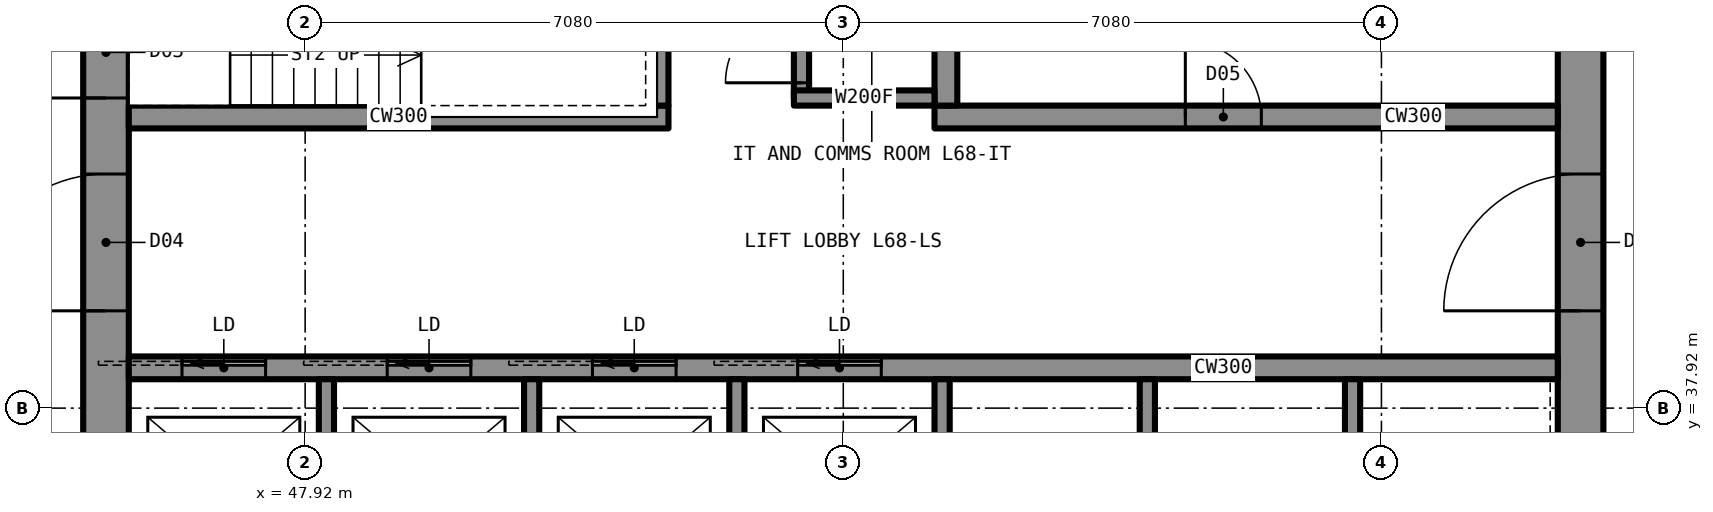
"""IFC4 building model, lengths in metres.
Left out: names, types, materials, properties, quantities, classifications, styles, units other than length and angle.
Written with IfcOpenShell. Run it as: python <this file> out.ifc"""

import sys

from ifc_helpers import new_model, si_unit, direction, frame, frame_2d, origin, place, context, subcontext, project, spatial, rectangle, extrude, element, fill, save


model = new_model("IFC4")
c1 = context("Model", 3, precision=1e-05, world=origin(), true_north=direction((0.0, 1.0)))
c2 = subcontext(c1, "Body", "Model", "MODEL_VIEW")
j1 = project(units=[si_unit("LENGTHUNIT", "METRE"), si_unit("PLANEANGLEUNIT", "RADIAN")], contexts=[c1])
p1 = place(None, origin())
s1 = spatial("IfcSite", under=j1, at=p1, CompositionType="ELEMENT")
p2 = place(p1, origin())
s2 = spatial("IfcBuilding", under=s1, at=p2, CompositionType="ELEMENT")
p3 = place(p2, frame((0.0, 0.0, 247.7)))
s3 = spatial("IfcBuildingStorey", under=s2, at=p3, CompositionType="ELEMENT", Elevation=247.7)
p4 = place(p3, frame((64.7, 35.6, 0.0), z_axis=(0.0, 0.0, 1.0), x_axis=(0.0, 1.0, 0.0)))
e1 = element("IfcWall", 1, at=p4, inside=s3, PredefinedType="SHEAR", context=c2, shape_type="SweptSolid", body=[
    extrude(rectangle(XDim=18.8, YDim=0.6, at=frame_2d((9.4, 0.0))), origin(), (0.0, 0.0, 1.0), 3.5),
])
p5 = place(p4, frame((13.4, 0.0, 0.0)))
e2 = element("IfcOpeningElement", 2, at=p5, cuts=e1, PredefinedType="OPENING", context=c2, shape_type="SweptSolid", body=[
    extrude(rectangle(XDim=1.8, YDim=2.2, at=frame_2d((0.9, 1.1))), frame((0.0, 0.31, 0.0), z_axis=(0.0, -1.0, 0.0), x_axis=(1.0, 0.0, 0.0)), (0.0, 0.0, 1.0), 0.62),
])
p6 = place(p4, frame((3.6, 0.0, 0.0)))
e3 = element("IfcOpeningElement", 3, at=p6, cuts=e1, PredefinedType="OPENING", context=c2, shape_type="SweptSolid", body=[
    extrude(rectangle(XDim=1.8, YDim=2.2, at=frame_2d((0.9, 1.1))), frame((0.0, 0.31, 0.0), z_axis=(0.0, -1.0, 0.0), x_axis=(1.0, 0.0, 0.0)), (0.0, 0.0, 1.0), 0.62),
])
p7 = place(p3, frame((45.3, 35.6, 0.0), z_axis=(0.0, 0.0, 1.0), x_axis=(0.0, 1.0, 0.0)))
e4 = element("IfcWall", 4, at=p7, inside=s3, PredefinedType="SHEAR", context=c2, shape_type="SweptSolid", body=[
    extrude(rectangle(XDim=18.8, YDim=0.6, at=frame_2d((9.4, 0.0))), origin(), (0.0, 0.0, 1.0), 3.5),
])
p8 = place(p7, frame((13.4, 0.0, 0.0)))
e5 = element("IfcOpeningElement", 5, at=p8, cuts=e4, PredefinedType="OPENING", context=c2, shape_type="SweptSolid", body=[
    extrude(rectangle(XDim=1.8, YDim=2.2, at=frame_2d((0.9, 1.1))), frame((0.0, 0.31, 0.0), z_axis=(0.0, -1.0, 0.0), x_axis=(1.0, 0.0, 0.0)), (0.0, 0.0, 1.0), 0.62),
])
p9 = place(p7, frame((3.6, 0.0, 0.0)))
e6 = element("IfcOpeningElement", 6, at=p9, cuts=e4, PredefinedType="OPENING", context=c2, shape_type="SweptSolid", body=[
    extrude(rectangle(XDim=1.8, YDim=2.2, at=frame_2d((0.9, 1.1))), frame((0.0, 0.31, 0.0), z_axis=(0.0, -1.0, 0.0), x_axis=(1.0, 0.0, 0.0)), (0.0, 0.0, 1.0), 0.62),
])
p10 = place(p7, frame((6.4, 0.0, 0.0)))
e7 = element("IfcOpeningElement", 7, at=p10, cuts=e4, PredefinedType="OPENING", context=c2, shape_type="SweptSolid", body=[
    extrude(rectangle(XDim=1.2, YDim=2.2, at=frame_2d((0.6, 1.1))), frame((0.0, 0.31, 0.0), z_axis=(0.0, -1.0, 0.0), x_axis=(1.0, 0.0, 0.0)), (0.0, 0.0, 1.0), 0.62),
])
p11 = place(p3, frame((45.6, 38.45, 0.0), z_axis=(0.0, 0.0, 1.0), x_axis=(1.0, 0.0, 0.0)))
e8 = element("IfcWall", 8, at=p11, inside=s3, PredefinedType="SHEAR", context=c2, shape_type="SweptSolid", body=[
    extrude(rectangle(XDim=18.8, YDim=0.3, at=frame_2d((9.4, 0.0))), origin(), (0.0, 0.0, 1.0), 3.5),
])
p12 = place(p11, frame((0.7, 0.0, 0.0)))
e9 = element("IfcOpeningElement", 9, at=p12, cuts=e8, PredefinedType="OPENING", context=c2, shape_type="SweptSolid", body=[
    extrude(rectangle(XDim=1.1, YDim=2.2, at=frame_2d((0.55, 1.1))), frame((0.0, 0.16, 0.0), z_axis=(0.0, -1.0, 0.0), x_axis=(1.0, 0.0, 0.0)), (0.0, 0.0, 1.0), 0.32),
])
p13 = place(p11, frame((3.4, 0.0, 0.0)))
e10 = element("IfcOpeningElement", 10, at=p13, cuts=e8, PredefinedType="OPENING", context=c2, shape_type="SweptSolid", body=[
    extrude(rectangle(XDim=1.1, YDim=2.2, at=frame_2d((0.55, 1.1))), frame((0.0, 0.16, 0.0), z_axis=(0.0, -1.0, 0.0), x_axis=(1.0, 0.0, 0.0)), (0.0, 0.0, 1.0), 0.32),
])
p14 = place(p11, frame((6.1, 0.0, 0.0)))
e11 = element("IfcOpeningElement", 11, at=p14, cuts=e8, PredefinedType="OPENING", context=c2, shape_type="SweptSolid", body=[
    extrude(rectangle(XDim=1.1, YDim=2.2, at=frame_2d((0.55, 1.1))), frame((0.0, 0.16, 0.0), z_axis=(0.0, -1.0, 0.0), x_axis=(1.0, 0.0, 0.0)), (0.0, 0.0, 1.0), 0.32),
])
p15 = place(p11, frame((8.8, 0.0, 0.0)))
e12 = element("IfcOpeningElement", 12, at=p15, cuts=e8, PredefinedType="OPENING", context=c2, shape_type="SweptSolid", body=[
    extrude(rectangle(XDim=1.1, YDim=2.2, at=frame_2d((0.55, 1.1))), frame((0.0, 0.16, 0.0), z_axis=(0.0, -1.0, 0.0), x_axis=(1.0, 0.0, 0.0)), (0.0, 0.0, 1.0), 0.32),
])
p16 = place(p3, frame((45.6, 41.75, 0.0), z_axis=(0.0, 0.0, 1.0), x_axis=(1.0, 0.0, 0.0)))
e13 = element("IfcWall", 13, at=p16, inside=s3, PredefinedType="SHEAR", context=c2, shape_type="SweptSolid", body=[
    extrude(rectangle(XDim=7.1, YDim=0.3, at=frame_2d((3.55, 0.0))), origin(), (0.0, 0.0, 1.0), 3.5),
])
p17 = place(p3, frame((56.2, 41.75, 0.0), z_axis=(0.0, 0.0, 1.0), x_axis=(1.0, 0.0, 0.0)))
e14 = element("IfcWall", 14, at=p17, inside=s3, PredefinedType="SHEAR", context=c2, shape_type="SweptSolid", body=[
    extrude(rectangle(XDim=8.2, YDim=0.3, at=frame_2d((4.1, 0.0))), origin(), (0.0, 0.0, 1.0), 3.5),
])
p18 = place(p17, frame((3.3, 0.0, 0.0)))
e15 = element("IfcOpeningElement", 15, at=p18, cuts=e14, PredefinedType="OPENING", context=c2, shape_type="SweptSolid", body=[
    extrude(rectangle(XDim=1.0, YDim=2.1, at=frame_2d((0.5, 1.05))), frame((0.0, 0.16, 0.0), z_axis=(0.0, -1.0, 0.0), x_axis=(1.0, 0.0, 0.0)), (0.0, 0.0, 1.0), 0.32),
])
p19 = place(p3, frame((52.55, 41.9, 0.0), z_axis=(0.0, 0.0, 1.0), x_axis=(0.0, 1.0, 0.0)))
e16 = element("IfcWall", 16, at=p19, inside=s3, PredefinedType="SHEAR", context=c2, shape_type="SweptSolid", body=[
    extrude(rectangle(XDim=6.2, YDim=0.3, at=frame_2d((3.1, 0.0))), origin(), (0.0, 0.0, 1.0), 3.5),
])
p20 = place(p19, frame((4.125, 0.0, 0.0)))
e17 = element("IfcOpeningElement", 17, at=p20, cuts=e16, PredefinedType="OPENING", context=c2, shape_type="SweptSolid", body=[
    extrude(rectangle(XDim=1.2, YDim=2.2, at=frame_2d((0.6, 1.1))), frame((0.0, 0.16, 0.0), z_axis=(0.0, -1.0, 0.0), x_axis=(1.0, 0.0, 0.0)), (0.0, 0.0, 1.0), 0.32),
])
p21 = place(p3, frame((56.35, 41.9, 0.0), z_axis=(0.0, 0.0, 1.0), x_axis=(0.0, 1.0, 0.0)))
e18 = element("IfcWall", 18, at=p21, inside=s3, PredefinedType="SHEAR", context=c2, shape_type="SweptSolid", body=[
    extrude(rectangle(XDim=9.5, YDim=0.3, at=frame_2d((4.75, 0.0))), origin(), (0.0, 0.0, 1.0), 3.5),
])
p22 = place(p21, frame((7.1, 0.0, 0.0)))
e19 = element("IfcOpeningElement", 19, at=p22, cuts=e18, PredefinedType="OPENING", context=c2, shape_type="SweptSolid", body=[
    extrude(rectangle(XDim=1.8, YDim=2.2, at=frame_2d((0.9, 1.1))), frame((0.0, 0.16, 0.0), z_axis=(0.0, -1.0, 0.0), x_axis=(1.0, 0.0, 0.0)), (0.0, 0.0, 1.0), 0.32),
])
p23 = place(p3, frame((54.45, 42.0, 0.0), z_axis=(0.0, 0.0, 1.0), x_axis=(0.0, 1.0, 0.0)))
e20 = element("IfcWall", 20, at=p23, inside=s3, PredefinedType="PARTITIONING", context=c2, shape_type="SweptSolid", body=[
    extrude(rectangle(XDim=1.3, YDim=0.2, at=frame_2d((0.65, 0.0))), origin(), (0.0, 0.0, 1.0), 3.33),
])
p24 = place(p23, frame((0.15, 0.0, 0.0)))
e21 = element("IfcOpeningElement", 21, at=p24, cuts=e20, PredefinedType="OPENING", context=c2, shape_type="SweptSolid", body=[
    extrude(rectangle(XDim=1.0, YDim=2.1, at=frame_2d((0.5, 1.05))), frame((0.0, 0.11, 0.0), z_axis=(0.0, -1.0, 0.0), x_axis=(1.0, 0.0, 0.0)), (0.0, 0.0, 1.0), 0.22),
])
p25 = place(p3, frame((54.35, 42.0, 0.0), z_axis=(0.0, 0.0, 1.0), x_axis=(1.0, 0.0, 0.0)))
e22 = element("IfcWall", 22, at=p25, inside=s3, PredefinedType="PARTITIONING", context=c2, shape_type="SweptSolid", body=[
    extrude(rectangle(XDim=1.85, YDim=0.2, at=frame_2d((0.925, 0.0))), origin(), (0.0, 0.0, 1.0), 3.33),
])
for number, where, z_axis, x_axis in (
    (23, (48.2, 35.6, 0.0), (0.0, 0.0, 1.0), (0.0, 1.0, 0.0)),
    (24, (50.9, 35.6, 0.0), (0.0, 0.0, 1.0), (0.0, 1.0, 0.0)),
    (25, (53.6, 35.6, 0.0), (0.0, 0.0, 1.0), (0.0, 1.0, 0.0)),
    (26, (56.3, 35.6, 0.0), (0.0, 0.0, 1.0), (0.0, 1.0, 0.0)),
    (27, (59.0, 35.6, 0.0), (0.0, 0.0, 1.0), (0.0, 1.0, 0.0)),
    (28, (61.7, 35.6, 0.0), (0.0, 0.0, 1.0), (0.0, 1.0, 0.0)),
):
    element("IfcWall", number, at=place(p3, frame(where, z_axis=z_axis, x_axis=x_axis)), inside=s3, PredefinedType="PARTITIONING", context=c2, shape_type="SweptSolid", body=[
        extrude(rectangle(XDim=2.7, YDim=0.2, at=frame_2d((1.35, 0.0))), origin(), (0.0, 0.0, 1.0), 3.33),
    ])
p26 = place(p24, origin())
e29 = element("IfcDoor", 29, at=p26, inside=s3, OperationType="SINGLE_SWING_LEFT", PredefinedType="DOOR", context=c2, shape_type="SweptSolid", body=[
    extrude(rectangle(XDim=1.0, YDim=2.1, at=frame_2d((0.5, 1.05))), frame((0.0, 0.025, 0.0), z_axis=(0.0, -1.0, 0.0), x_axis=(1.0, 0.0, 0.0)), (0.0, 0.0, 1.0), 0.05),
])
fill(e21, e29)
p27 = place(p9, origin())
e30 = element("IfcDoor", 30, at=p27, inside=s3, OperationType="DOUBLE_DOOR_SINGLE_SWING", PredefinedType="DOOR", context=c2, shape_type="SweptSolid", body=[
    extrude(rectangle(XDim=1.8, YDim=2.2, at=frame_2d((0.9, 1.1))), frame((0.0, 0.025, 0.0), z_axis=(0.0, -1.0, 0.0), x_axis=(1.0, 0.0, 0.0)), (0.0, 0.0, 1.0), 0.05),
])
fill(e6, e30)
p28 = place(p6, origin())
e31 = element("IfcDoor", 31, at=p28, inside=s3, OperationType="DOUBLE_DOOR_SINGLE_SWING", PredefinedType="DOOR", context=c2, shape_type="SweptSolid", body=[
    extrude(rectangle(XDim=1.8, YDim=2.2, at=frame_2d((0.9, 1.1))), frame((0.0, 0.025, 0.0), z_axis=(0.0, -1.0, 0.0), x_axis=(1.0, 0.0, 0.0)), (0.0, 0.0, 1.0), 0.05),
])
fill(e3, e31)
p29 = place(p10, origin())
e32 = element("IfcDoor", 32, at=p29, inside=s3, OperationType="SINGLE_SWING_LEFT", PredefinedType="DOOR", context=c2, shape_type="SweptSolid", body=[
    extrude(rectangle(XDim=1.2, YDim=2.2, at=frame_2d((0.6, 1.1))), frame((0.0, 0.025, 0.0), z_axis=(0.0, -1.0, 0.0), x_axis=(1.0, 0.0, 0.0)), (0.0, 0.0, 1.0), 0.05),
])
fill(e7, e32)
p30 = place(p18, origin())
e33 = element("IfcDoor", 33, at=p30, inside=s3, OperationType="SINGLE_SWING_LEFT", PredefinedType="DOOR", context=c2, shape_type="SweptSolid", body=[
    extrude(rectangle(XDim=1.0, YDim=2.1, at=frame_2d((0.5, 1.05))), frame((0.0, 0.025, 0.0), z_axis=(0.0, -1.0, 0.0), x_axis=(1.0, 0.0, 0.0)), (0.0, 0.0, 1.0), 0.05),
])
fill(e15, e33)
p31 = place(p12, origin())
e34 = element("IfcDoor", 34, at=p31, inside=s3, OperationType="SLIDING_TO_LEFT", PredefinedType="DOOR", context=c2, shape_type="SweptSolid", body=[
    extrude(rectangle(XDim=1.1, YDim=2.2, at=frame_2d((0.55, 1.1))), frame((0.0, 0.025, 0.0), z_axis=(0.0, -1.0, 0.0), x_axis=(1.0, 0.0, 0.0)), (0.0, 0.0, 1.0), 0.05),
])
fill(e9, e34)
p32 = place(p13, origin())
e35 = element("IfcDoor", 35, at=p32, inside=s3, OperationType="SLIDING_TO_LEFT", PredefinedType="DOOR", context=c2, shape_type="SweptSolid", body=[
    extrude(rectangle(XDim=1.1, YDim=2.2, at=frame_2d((0.55, 1.1))), frame((0.0, 0.025, 0.0), z_axis=(0.0, -1.0, 0.0), x_axis=(1.0, 0.0, 0.0)), (0.0, 0.0, 1.0), 0.05),
])
fill(e10, e35)
p33 = place(p14, origin())
e36 = element("IfcDoor", 36, at=p33, inside=s3, OperationType="SLIDING_TO_LEFT", PredefinedType="DOOR", context=c2, shape_type="SweptSolid", body=[
    extrude(rectangle(XDim=1.1, YDim=2.2, at=frame_2d((0.55, 1.1))), frame((0.0, 0.025, 0.0), z_axis=(0.0, -1.0, 0.0), x_axis=(1.0, 0.0, 0.0)), (0.0, 0.0, 1.0), 0.05),
])
fill(e11, e36)
p34 = place(p15, origin())
e37 = element("IfcDoor", 37, at=p34, inside=s3, OperationType="SLIDING_TO_LEFT", PredefinedType="DOOR", context=c2, shape_type="SweptSolid", body=[
    extrude(rectangle(XDim=1.1, YDim=2.2, at=frame_2d((0.55, 1.1))), frame((0.0, 0.025, 0.0), z_axis=(0.0, -1.0, 0.0), x_axis=(1.0, 0.0, 0.0)), (0.0, 0.0, 1.0), 0.05),
])
fill(e12, e37)
save(model, sys.argv[1])
